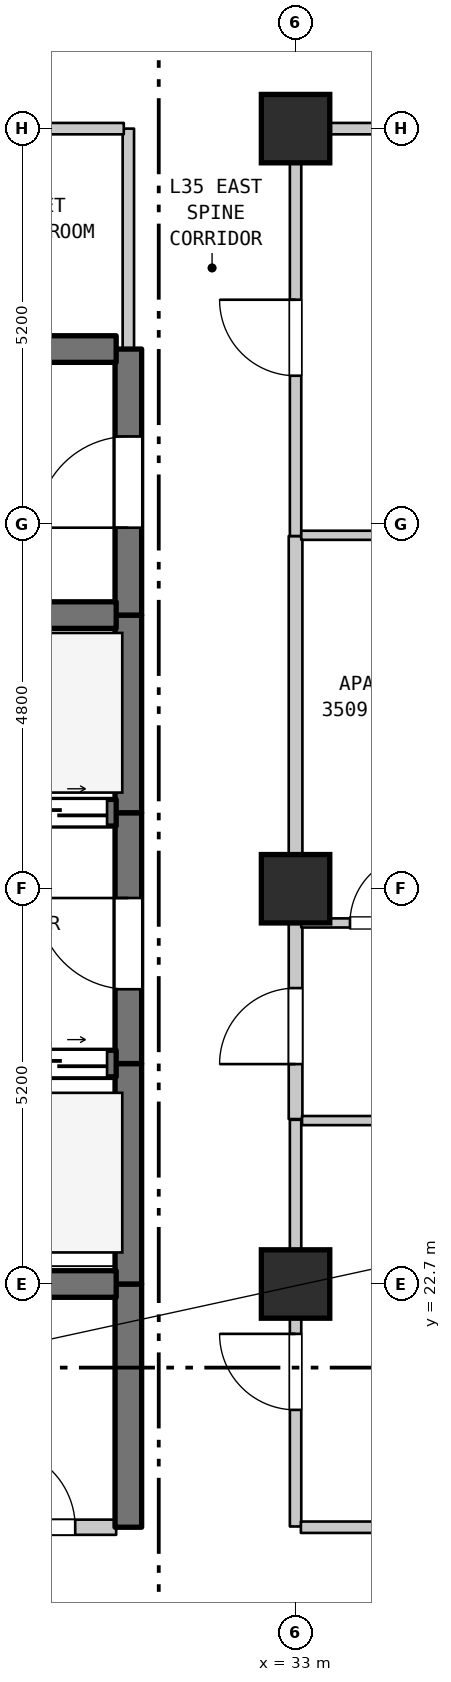
"""IFC4 building model, lengths in metres.
Left out: names, types, materials, properties, quantities, classifications, styles, units other than length and angle.
Written with IfcOpenShell. Run it as: python <this file> out.ifc"""

import sys

from ifc_helpers import new_model, si_unit, direction, frame, frame_2d, origin, origin_2d, place, context, subcontext, project, spatial, rectangle, extrude, element, fill, save


model = new_model("IFC4")
c1 = context("Model", 3, precision=1e-05, world=origin(), true_north=direction((0.0, 1.0)))
c2 = subcontext(c1, "Body", "Model", "MODEL_VIEW")
j1 = project(units=[si_unit("LENGTHUNIT", "METRE"), si_unit("PLANEANGLEUNIT", "RADIAN")], contexts=[c1])
p1 = place(None, origin())
s1 = spatial("IfcSite", under=j1, at=p1, CompositionType="ELEMENT")
p2 = place(p1, origin())
s2 = spatial("IfcBuilding", under=s1, at=p2, CompositionType="ELEMENT")
p3 = place(p2, frame((0.0, 0.0, 144.6)))
s3 = spatial("IfcBuildingStorey", under=s2, at=p3, CompositionType="ELEMENT", Elevation=144.6)
for number, where, z_axis, x_axis in (
    (1, (33.0, 22.7, 0.0), (0.0, 0.0, 1.0), (1.0, 0.0, 0.0)),
    (2, (33.0, 27.9, 0.0), (0.0, 0.0, 1.0), (1.0, 0.0, 0.0)),
    (3, (33.0, 37.9, 0.0), (0.0, 0.0, 1.0), (1.0, 0.0, 0.0)),
):
    element("IfcColumn", number, at=place(p3, frame(where, z_axis=z_axis, x_axis=x_axis)), inside=s3, PredefinedType="COLUMN", context=c2, shape_type="SweptSolid", body=[
        extrude(rectangle(XDim=0.9, YDim=0.9, at=origin_2d()), origin(), (0.0, 0.0, 1.0), 3.7),
    ])
p4 = place(p3, frame((30.8, 19.5, 0.0), z_axis=(0.0, 0.0, 1.0), x_axis=(0.0, 1.0, 0.0)))
e4 = element("IfcWall", 4, at=p4, inside=s3, PredefinedType="SHEAR", context=c2, shape_type="SweptSolid", body=[
    extrude(rectangle(XDim=3.2, YDim=0.35, at=frame_2d((1.6, 0.0))), origin(), (0.0, 0.0, 1.0), 3.385),
])
p5 = place(p3, frame((30.8, 22.7, 0.0), z_axis=(0.0, 0.0, 1.0), x_axis=(0.0, 1.0, 0.0)))
e5 = element("IfcWall", 5, at=p5, inside=s3, PredefinedType="SHEAR", context=c2, shape_type="SweptSolid", body=[
    extrude(rectangle(XDim=2.9, YDim=0.35, at=frame_2d((1.45, 0.0))), origin(), (0.0, 0.0, 1.0), 3.385),
])
p6 = place(p3, frame((30.8, 25.6, 0.0), z_axis=(0.0, 0.0, 1.0), x_axis=(0.0, 1.0, 0.0)))
e6 = element("IfcWall", 6, at=p6, inside=s3, PredefinedType="SHEAR", context=c2, shape_type="SweptSolid", body=[
    extrude(rectangle(XDim=3.3, YDim=0.35, at=frame_2d((1.65, 0.0))), origin(), (0.0, 0.0, 1.0), 3.385),
])
p7 = place(p6, frame((0.978, 0.0, 0.0)))
e7 = element("IfcOpeningElement", 7, at=p7, cuts=e6, PredefinedType="OPENING", context=c2, shape_type="SweptSolid", body=[
    extrude(rectangle(XDim=1.2, YDim=2.2, at=frame_2d((0.6, 1.1))), frame((0.0, 0.185, 0.0), z_axis=(0.0, -1.0, 0.0), x_axis=(1.0, 0.0, 0.0)), (0.0, 0.0, 1.0), 0.37),
])
p8 = place(p3, frame((30.8, 28.9, 0.0), z_axis=(0.0, 0.0, 1.0), x_axis=(0.0, 1.0, 0.0)))
e8 = element("IfcWall", 8, at=p8, inside=s3, PredefinedType="SHEAR", context=c2, shape_type="SweptSolid", body=[
    extrude(rectangle(XDim=2.6, YDim=0.35, at=frame_2d((1.3, 0.0))), origin(), (0.0, 0.0, 1.0), 3.385),
])
p9 = place(p3, frame((30.8, 31.5, 0.0), z_axis=(0.0, 0.0, 1.0), x_axis=(0.0, 1.0, 0.0)))
e9 = element("IfcWall", 9, at=p9, inside=s3, PredefinedType="SHEAR", context=c2, shape_type="SweptSolid", body=[
    extrude(rectangle(XDim=3.5, YDim=0.35, at=frame_2d((1.75, 0.0))), origin(), (0.0, 0.0, 1.0), 3.385),
])
p10 = place(p9, frame((1.15, 0.0, 0.0)))
e10 = element("IfcOpeningElement", 10, at=p10, cuts=e9, PredefinedType="OPENING", context=c2, shape_type="SweptSolid", body=[
    extrude(rectangle(XDim=1.2, YDim=2.2, at=frame_2d((0.6, 1.1))), frame((0.0, 0.185, 0.0), z_axis=(0.0, -1.0, 0.0), x_axis=(1.0, 0.0, 0.0)), (0.0, 0.0, 1.0), 0.37),
])
p11 = place(p3, frame((30.8, 35.0, 0.0), z_axis=(0.0, 0.0, 1.0), x_axis=(0.0, 1.0, 0.0)))
e11 = element("IfcWall", 11, at=p11, inside=s3, PredefinedType="STANDARD", context=c2, shape_type="SweptSolid", body=[
    extrude(rectangle(XDim=2.9, YDim=0.15, at=frame_2d((1.45, 0.0))), origin(), (0.0, 0.0, 1.0), 3.385),
])
p12 = place(p3, frame((33.0, 19.51, 0.0), z_axis=(0.0, 0.0, 1.0), x_axis=(0.0, 1.0, 0.0)))
e12 = element("IfcWall", 12, at=p12, inside=s3, PredefinedType="STANDARD", context=c2, shape_type="SweptSolid", body=[
    extrude(rectangle(XDim=5.35, YDim=0.15, at=frame_2d((2.675, 0.0))), origin(), (0.0, 0.0, 1.0), 2.935),
])
p13 = place(p12, frame((1.534, 0.0, 0.0)))
e13 = element("IfcOpeningElement", 13, at=p13, cuts=e12, PredefinedType="OPENING", context=c2, shape_type="SweptSolid", body=[
    extrude(rectangle(XDim=1.0, YDim=2.15, at=frame_2d((0.5, 1.075))), frame((0.0, 0.085, 0.0), z_axis=(0.0, -1.0, 0.0), x_axis=(1.0, 0.0, 0.0)), (0.0, 0.0, 1.0), 0.17),
])
p14 = place(p3, frame((33.0, 24.87, 0.0), z_axis=(0.0, 0.0, 1.0), x_axis=(0.0, 1.0, 0.0)))
e14 = element("IfcWall", 14, at=p14, inside=s3, PredefinedType="STANDARD", context=c2, shape_type="SweptSolid", body=[
    extrude(rectangle(XDim=2.6, YDim=0.18, at=frame_2d((1.3, 0.0))), origin(), (0.0, 0.0, 1.0), 2.935),
])
p15 = place(p14, frame((0.723, 0.0, 0.0)))
e15 = element("IfcOpeningElement", 15, at=p15, cuts=e14, PredefinedType="OPENING", context=c2, shape_type="SweptSolid", body=[
    extrude(rectangle(XDim=1.0, YDim=2.15, at=frame_2d((0.5, 1.075))), frame((0.0, 0.1, 0.0), z_axis=(0.0, -1.0, 0.0), x_axis=(1.0, 0.0, 0.0)), (0.0, 0.0, 1.0), 0.2),
])
p16 = place(p3, frame((33.0, 27.47, 0.0), z_axis=(0.0, 0.0, 1.0), x_axis=(0.0, 1.0, 0.0)))
e16 = element("IfcWall", 16, at=p16, inside=s3, PredefinedType="STANDARD", context=c2, shape_type="SweptSolid", body=[
    extrude(rectangle(XDim=5.07, YDim=0.18, at=frame_2d((2.535, 0.0))), origin(), (0.0, 0.0, 1.0), 2.885),
])
p17 = place(p3, frame((33.0, 32.54, 0.0), z_axis=(0.0, 0.0, 1.0), x_axis=(0.0, 1.0, 0.0)))
e17 = element("IfcWall", 17, at=p17, inside=s3, PredefinedType="STANDARD", context=c2, shape_type="SweptSolid", body=[
    extrude(rectangle(XDim=5.36, YDim=0.15, at=frame_2d((2.68, 0.0))), origin(), (0.0, 0.0, 1.0), 2.885),
])
p18 = place(p17, frame((2.109, 0.0, 0.0)))
e18 = element("IfcOpeningElement", 18, at=p18, cuts=e17, PredefinedType="OPENING", context=c2, shape_type="SweptSolid", body=[
    extrude(rectangle(XDim=1.0, YDim=2.15, at=frame_2d((0.5, 1.075))), frame((0.0, 0.085, 0.0), z_axis=(0.0, -1.0, 0.0), x_axis=(1.0, 0.0, 0.0)), (0.0, 0.0, 1.0), 0.17),
])
p19 = place(p3, frame((28.585, 19.5, 0.0), z_axis=(0.0, 0.0, 1.0), x_axis=(1.0, 0.0, 0.0)))
e19 = element("IfcWall", 19, at=p19, inside=s3, PredefinedType="STANDARD", context=c2, shape_type="SweptSolid", body=[
    extrude(rectangle(XDim=2.055, YDim=0.2, at=frame_2d((1.027, 0.0))), origin(), (0.0, 0.0, 1.0), 3.385),
])
p20 = place(p19, frame((0.466, 0.0, 0.0)))
e20 = element("IfcOpeningElement", 20, at=p20, cuts=e19, PredefinedType="OPENING", context=c2, shape_type="SweptSolid", body=[
    extrude(rectangle(XDim=1.05, YDim=2.15, at=frame_2d((0.525, 1.075))), frame((0.0, 0.11, 0.0), z_axis=(0.0, -1.0, 0.0), x_axis=(1.0, 0.0, 0.0)), (0.0, 0.0, 1.0), 0.22),
])
p21 = place(p3, frame((33.07, 19.5, 0.0), z_axis=(0.0, 0.0, 1.0), x_axis=(1.0, 0.0, 0.0)))
e21 = element("IfcWall", 21, at=p21, inside=s3, PredefinedType="STANDARD", context=c2, shape_type="SweptSolid", body=[
    extrude(rectangle(XDim=21.51, YDim=0.15, at=frame_2d((10.755, 0.0))), origin(), (0.0, 0.0, 1.0), 3.385),
])
p22 = place(p21, frame((10.185, 0.0, 0.0)))
e22 = element("IfcOpeningElement", 22, at=p22, cuts=e21, PredefinedType="OPENING", context=c2, shape_type="SweptSolid", body=[
    extrude(rectangle(XDim=1.0, YDim=2.15, at=frame_2d((0.5, 1.075))), frame((0.0, 0.085, 0.0), z_axis=(0.0, -1.0, 0.0), x_axis=(1.0, 0.0, 0.0)), (0.0, 0.0, 1.0), 0.17),
])
p23 = place(p3, frame((28.585, 22.7, 0.0), z_axis=(0.0, 0.0, 1.0), x_axis=(1.0, 0.0, 0.0)))
e23 = element("IfcWall", 23, at=p23, inside=s3, PredefinedType="SHEAR", context=c2, shape_type="SweptSolid", body=[
    extrude(rectangle(XDim=2.055, YDim=0.35, at=frame_2d((1.027, 0.0))), origin(), (0.0, 0.0, 1.0), 3.385),
])
p24 = place(p3, frame((33.085, 24.85, 0.0), z_axis=(0.0, 0.0, 1.0), x_axis=(1.0, 0.0, 0.0)))
e24 = element("IfcWall", 24, at=p24, inside=s3, PredefinedType="PARTITIONING", context=c2, shape_type="SweptSolid", body=[
    extrude(rectangle(XDim=23.905, YDim=0.12, at=frame_2d((11.953, 0.0))), origin(), (0.0, 0.0, 1.0), 3.385),
])
p25 = place(p3, frame((27.46, 25.6, 0.0), z_axis=(0.0, 0.0, 1.0), x_axis=(1.0, 0.0, 0.0)))
e25 = element("IfcWall", 25, at=p25, inside=s3, PredefinedType="SHEAR", context=c2, shape_type="SweptSolid", body=[
    extrude(rectangle(XDim=3.18, YDim=0.35, at=frame_2d((1.59, 0.0))), origin(), (0.0, 0.0, 1.0), 3.385),
])
p26 = place(p25, frame((0.12, 0.0, 0.0)))
e26 = element("IfcOpeningElement", 26, at=p26, cuts=e25, PredefinedType="OPENING", context=c2, shape_type="SweptSolid", body=[
    extrude(rectangle(XDim=1.25, YDim=2.2, at=frame_2d((0.625, 1.1))), frame((0.0, 0.185, 0.0), z_axis=(0.0, -1.0, 0.0), x_axis=(1.0, 0.0, 0.0)), (0.0, 0.0, 1.0), 0.37),
])
p27 = place(p25, frame((1.81, 0.0, 0.0)))
e27 = element("IfcOpeningElement", 27, at=p27, cuts=e25, PredefinedType="OPENING", context=c2, shape_type="SweptSolid", body=[
    extrude(rectangle(XDim=1.25, YDim=2.2, at=frame_2d((0.625, 1.1))), frame((0.0, 0.185, 0.0), z_axis=(0.0, -1.0, 0.0), x_axis=(1.0, 0.0, 0.0)), (0.0, 0.0, 1.0), 0.37),
])
p28 = place(p3, frame((33.075, 27.45, 0.0), z_axis=(0.0, 0.0, 1.0), x_axis=(1.0, 0.0, 0.0)))
e28 = element("IfcWall", 28, at=p28, inside=s3, PredefinedType="PARTITIONING", context=c2, shape_type="SweptSolid", body=[
    extrude(rectangle(XDim=2.364, YDim=0.12, at=frame_2d((1.182, 0.0))), origin(), (0.0, 0.0, 1.0), 3.385),
])
p29 = place(p28, frame((0.641, 0.0, 0.0)))
e29 = element("IfcOpeningElement", 29, at=p29, cuts=e28, PredefinedType="OPENING", context=c2, shape_type="SweptSolid", body=[
    extrude(rectangle(XDim=0.9, YDim=2.15, at=frame_2d((0.45, 1.075))), frame((0.0, 0.07, 0.0), z_axis=(0.0, -1.0, 0.0), x_axis=(1.0, 0.0, 0.0)), (0.0, 0.0, 1.0), 0.14),
])
p30 = place(p3, frame((27.46, 28.9, 0.0), z_axis=(0.0, 0.0, 1.0), x_axis=(1.0, 0.0, 0.0)))
e30 = element("IfcWall", 30, at=p30, inside=s3, PredefinedType="SHEAR", context=c2, shape_type="SweptSolid", body=[
    extrude(rectangle(XDim=3.18, YDim=0.35, at=frame_2d((1.59, 0.0))), origin(), (0.0, 0.0, 1.0), 3.385),
])
p31 = place(p30, frame((0.12, 0.0, 0.0)))
e31 = element("IfcOpeningElement", 31, at=p31, cuts=e30, PredefinedType="OPENING", context=c2, shape_type="SweptSolid", body=[
    extrude(rectangle(XDim=1.25, YDim=2.2, at=frame_2d((0.625, 1.1))), frame((0.0, 0.185, 0.0), z_axis=(0.0, -1.0, 0.0), x_axis=(1.0, 0.0, 0.0)), (0.0, 0.0, 1.0), 0.37),
])
p32 = place(p30, frame((1.81, 0.0, 0.0)))
e32 = element("IfcOpeningElement", 32, at=p32, cuts=e30, PredefinedType="OPENING", context=c2, shape_type="SweptSolid", body=[
    extrude(rectangle(XDim=1.25, YDim=2.2, at=frame_2d((0.625, 1.1))), frame((0.0, 0.185, 0.0), z_axis=(0.0, -1.0, 0.0), x_axis=(1.0, 0.0, 0.0)), (0.0, 0.0, 1.0), 0.37),
])
p33 = place(p3, frame((27.46, 31.5, 0.0), z_axis=(0.0, 0.0, 1.0), x_axis=(1.0, 0.0, 0.0)))
e33 = element("IfcWall", 33, at=p33, inside=s3, PredefinedType="SHEAR", context=c2, shape_type="SweptSolid", body=[
    extrude(rectangle(XDim=3.18, YDim=0.35, at=frame_2d((1.59, 0.0))), origin(), (0.0, 0.0, 1.0), 3.385),
])
p34 = place(p3, frame((33.075, 32.55, 0.0), z_axis=(0.0, 0.0, 1.0), x_axis=(1.0, 0.0, 0.0)))
e34 = element("IfcWall", 34, at=p34, inside=s3, PredefinedType="PARTITIONING", context=c2, shape_type="SweptSolid", body=[
    extrude(rectangle(XDim=2.364, YDim=0.12, at=frame_2d((1.182, 0.0))), origin(), (0.0, 0.0, 1.0), 3.385),
])
p35 = place(p3, frame((26.645, 35.0, 0.0), z_axis=(0.0, 0.0, 1.0), x_axis=(1.0, 0.0, 0.0)))
e35 = element("IfcWall", 35, at=p35, inside=s3, PredefinedType="SHEAR", context=c2, shape_type="SweptSolid", body=[
    extrude(rectangle(XDim=3.995, YDim=0.35, at=frame_2d((1.998, 0.0))), origin(), (0.0, 0.0, 1.0), 3.385),
])
p36 = place(p35, frame((1.508, 0.0, 0.0)))
e36 = element("IfcOpeningElement", 36, at=p36, cuts=e35, PredefinedType="OPENING", context=c2, shape_type="SweptSolid", body=[
    extrude(rectangle(XDim=0.95, YDim=2.15, at=frame_2d((0.475, 1.075))), frame((0.0, 0.185, 0.0), z_axis=(0.0, -1.0, 0.0), x_axis=(1.0, 0.0, 0.0)), (0.0, 0.0, 1.0), 0.37),
])
p37 = place(p3, frame((26.645, 37.9, 0.0), z_axis=(0.0, 0.0, 1.0), x_axis=(1.0, 0.0, 0.0)))
e37 = element("IfcWall", 37, at=p37, inside=s3, PredefinedType="STANDARD", context=c2, shape_type="SweptSolid", body=[
    extrude(rectangle(XDim=4.095, YDim=0.15, at=frame_2d((2.047, 0.0))), origin(), (0.0, 0.0, 1.0), 2.885),
])
p38 = place(p3, frame((33.06, 37.9, 0.0), z_axis=(0.0, 0.0, 1.0), x_axis=(1.0, 0.0, 0.0)))
e38 = element("IfcWall", 38, at=p38, inside=s3, PredefinedType="STANDARD", context=c2, shape_type="SweptSolid", body=[
    extrude(rectangle(XDim=11.879, YDim=0.15, at=frame_2d((5.939, 0.0))), origin(), (0.0, 0.0, 1.0), 3.385),
])
p39 = place(p38, frame((5.439, 0.0, 0.0)))
e39 = element("IfcOpeningElement", 39, at=p39, cuts=e38, PredefinedType="OPENING", context=c2, shape_type="SweptSolid", body=[
    extrude(rectangle(XDim=1.0, YDim=2.15, at=frame_2d((0.5, 1.075))), frame((0.0, 0.085, 0.0), z_axis=(0.0, -1.0, 0.0), x_axis=(1.0, 0.0, 0.0)), (0.0, 0.0, 1.0), 0.17),
])
p40 = place(p7, origin())
e40 = element("IfcDoor", 40, at=p40, inside=s3, OperationType="SINGLE_SWING_RIGHT", PredefinedType="DOOR", context=c2, shape_type="SweptSolid", body=[
    extrude(rectangle(XDim=1.2, YDim=2.2, at=frame_2d((0.6, 1.1))), frame((0.0, 0.025, 0.0), z_axis=(0.0, -1.0, 0.0), x_axis=(1.0, 0.0, 0.0)), (0.0, 0.0, 1.0), 0.05),
])
fill(e7, e40)
p41 = place(p10, origin())
e41 = element("IfcDoor", 41, at=p41, inside=s3, OperationType="SINGLE_SWING_LEFT", PredefinedType="DOOR", context=c2, shape_type="SweptSolid", body=[
    extrude(rectangle(XDim=1.2, YDim=2.2, at=frame_2d((0.6, 1.1))), frame((0.0, 0.025, 0.0), z_axis=(0.0, -1.0, 0.0), x_axis=(1.0, 0.0, 0.0)), (0.0, 0.0, 1.0), 0.05),
])
fill(e10, e41)
p42 = place(p13, origin())
e42 = element("IfcDoor", 42, at=p42, inside=s3, OperationType="SINGLE_SWING_RIGHT", PredefinedType="DOOR", context=c2, shape_type="SweptSolid", body=[
    extrude(rectangle(XDim=1.0, YDim=2.15, at=frame_2d((0.5, 1.075))), frame((0.0, 0.025, 0.0), z_axis=(0.0, -1.0, 0.0), x_axis=(1.0, 0.0, 0.0)), (0.0, 0.0, 1.0), 0.05),
])
fill(e13, e42)
p43 = place(p15, origin())
e43 = element("IfcDoor", 43, at=p43, inside=s3, OperationType="SINGLE_SWING_LEFT", PredefinedType="DOOR", context=c2, shape_type="SweptSolid", body=[
    extrude(rectangle(XDim=1.0, YDim=2.15, at=frame_2d((0.5, 1.075))), frame((0.0, 0.025, 0.0), z_axis=(0.0, -1.0, 0.0), x_axis=(1.0, 0.0, 0.0)), (0.0, 0.0, 1.0), 0.05),
])
fill(e15, e43)
p44 = place(p18, origin())
e44 = element("IfcDoor", 44, at=p44, inside=s3, OperationType="SINGLE_SWING_RIGHT", PredefinedType="DOOR", context=c2, shape_type="SweptSolid", body=[
    extrude(rectangle(XDim=1.0, YDim=2.15, at=frame_2d((0.5, 1.075))), frame((0.0, 0.025, 0.0), z_axis=(0.0, -1.0, 0.0), x_axis=(1.0, 0.0, 0.0)), (0.0, 0.0, 1.0), 0.05),
])
fill(e18, e44)
p45 = place(p20, origin())
e45 = element("IfcDoor", 45, at=p45, inside=s3, OperationType="SINGLE_SWING_LEFT", PredefinedType="DOOR", context=c2, shape_type="SweptSolid", body=[
    extrude(rectangle(XDim=1.05, YDim=2.15, at=frame_2d((0.525, 1.075))), frame((0.0, 0.025, 0.0), z_axis=(0.0, -1.0, 0.0), x_axis=(1.0, 0.0, 0.0)), (0.0, 0.0, 1.0), 0.05),
])
fill(e20, e45)
p46 = place(p27, origin())
e46 = element("IfcDoor", 46, at=p46, inside=s3, OperationType="DOUBLE_DOOR_SLIDING", PredefinedType="DOOR", context=c2, shape_type="SweptSolid", body=[
    extrude(rectangle(XDim=1.25, YDim=2.2, at=frame_2d((0.625, 1.1))), frame((0.0, 0.025, 0.0), z_axis=(0.0, -1.0, 0.0), x_axis=(1.0, 0.0, 0.0)), (0.0, 0.0, 1.0), 0.05),
])
fill(e27, e46)
p47 = place(p29, origin())
e47 = element("IfcDoor", 47, at=p47, inside=s3, OperationType="SINGLE_SWING_RIGHT", PredefinedType="DOOR", context=c2, shape_type="SweptSolid", body=[
    extrude(rectangle(XDim=0.9, YDim=2.15, at=frame_2d((0.45, 1.075))), frame((0.0, 0.025, 0.0), z_axis=(0.0, -1.0, 0.0), x_axis=(1.0, 0.0, 0.0)), (0.0, 0.0, 1.0), 0.05),
])
fill(e29, e47)
p48 = place(p32, origin())
e48 = element("IfcDoor", 48, at=p48, inside=s3, OperationType="DOUBLE_DOOR_SLIDING", PredefinedType="DOOR", context=c2, shape_type="SweptSolid", body=[
    extrude(rectangle(XDim=1.25, YDim=2.2, at=frame_2d((0.625, 1.1))), frame((0.0, 0.025, 0.0), z_axis=(0.0, -1.0, 0.0), x_axis=(1.0, 0.0, 0.0)), (0.0, 0.0, 1.0), 0.05),
])
fill(e32, e48)
save(model, sys.argv[1])
